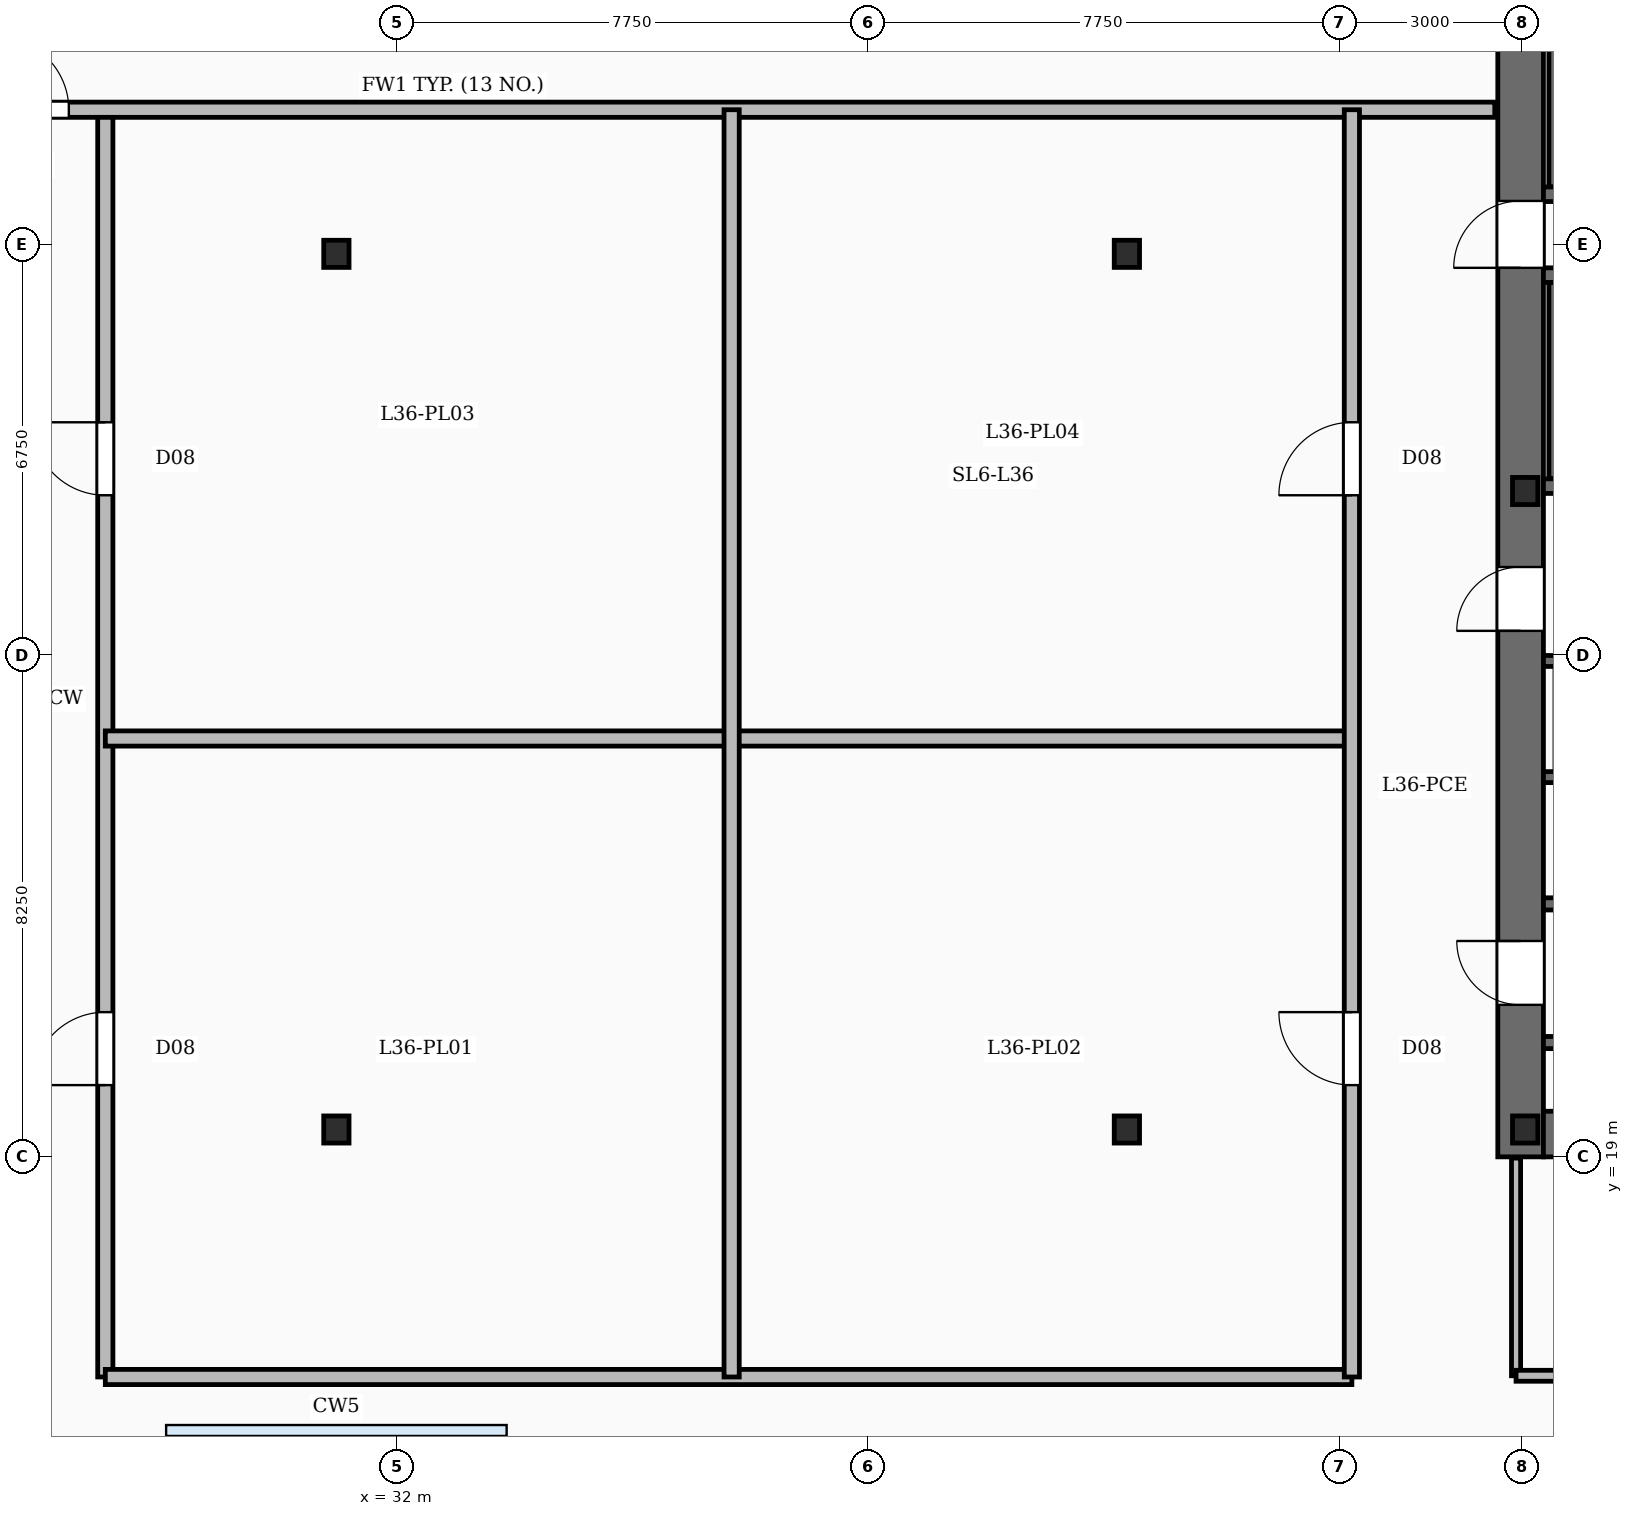
"""IFC4 building model, lengths in metres.
Left out: names, types, materials, properties, quantities, classifications, styles, units other than length and angle.
Written with IfcOpenShell. Run it as: python <this file> out.ifc"""

import sys

from ifc_helpers import new_model, si_unit, direction, frame, frame_2d, origin, origin_2d, place, context, subcontext, project, spatial, rectangle, i_section, extrude, element, fill, save


model = new_model("IFC4")
c1 = context("Model", 3, precision=1e-05, world=origin(), true_north=direction((0.0, 1.0)))
c2 = subcontext(c1, "Body", "Model", "MODEL_VIEW")
j1 = project(units=[si_unit("LENGTHUNIT", "METRE"), si_unit("PLANEANGLEUNIT", "RADIAN")], contexts=[c1])
p1 = place(None, origin())
s1 = spatial("IfcSite", under=j1, at=p1, CompositionType="ELEMENT")
p2 = place(p1, origin())
s2 = spatial("IfcBuilding", under=s1, at=p2, CompositionType="ELEMENT")
p3 = place(p2, frame((0.0, 0.0, 153.25)))
s3 = spatial("IfcBuildingStorey", under=s2, at=p3, CompositionType="ELEMENT", Elevation=153.25)
p4 = place(p3, frame((50.475, 19.0, -0.42), z_axis=(0.0, 0.0, 1.0), x_axis=(0.0, 1.0, 0.0)))
e1 = element("IfcWall", 1, at=p4, inside=s3, PredefinedType="SHEAR", context=c2, shape_type="SweptSolid", body=[
    extrude(rectangle(XDim=20.8, YDim=0.75, at=frame_2d((10.4, 0.0))), origin(), (0.0, 0.0, 1.0), 5.17),
])
p5 = place(p4, frame((2.5, 0.0, 0.42)))
e2 = element("IfcOpeningElement", 2, at=p5, cuts=e1, PredefinedType="OPENING", context=c2, shape_type="SweptSolid", body=[
    extrude(rectangle(XDim=1.05, YDim=2.15, at=frame_2d((0.525, 1.075))), frame((0.0, 0.385, 0.0), z_axis=(0.0, -1.0, 0.0), x_axis=(1.0, 0.0, 0.0)), (0.0, 0.0, 1.0), 0.77),
])
p6 = place(p4, frame((8.65, 0.0, 0.42)))
e3 = element("IfcOpeningElement", 3, at=p6, cuts=e1, PredefinedType="OPENING", context=c2, shape_type="SweptSolid", body=[
    extrude(rectangle(XDim=1.05, YDim=2.15, at=frame_2d((0.525, 1.075))), frame((0.0, 0.385, 0.0), z_axis=(0.0, -1.0, 0.0), x_axis=(1.0, 0.0, 0.0)), (0.0, 0.0, 1.0), 0.77),
])
p7 = place(p4, frame((14.62, 0.0, 0.42)))
e4 = element("IfcOpeningElement", 4, at=p7, cuts=e1, PredefinedType="OPENING", context=c2, shape_type="SweptSolid", body=[
    extrude(rectangle(XDim=1.1, YDim=2.15, at=frame_2d((0.55, 1.075))), frame((0.0, 0.385, 0.0), z_axis=(0.0, -1.0, 0.0), x_axis=(1.0, 0.0, 0.0)), (0.0, 0.0, 1.0), 0.77),
])
p8 = place(p3, frame((50.85, 19.375, -0.42), z_axis=(0.0, 0.0, 1.0), x_axis=(1.0, 0.0, 0.0)))
e5 = element("IfcWall", 5, at=p8, inside=s3, PredefinedType="SHEAR", context=c2, shape_type="SweptSolid", body=[
    extrude(rectangle(XDim=9.2, YDim=0.75, at=frame_2d((4.6, 0.0))), origin(), (0.0, 0.0, 1.0), 5.17),
])
for number, where, z_axis, x_axis in (
    (6, (50.55, 19.45, -0.42), (0.0, 0.0, 1.0), (1.0, 0.0, 0.0)),
    (7, (50.55, 29.95, -0.42), (0.0, 0.0, 1.0), (1.0, 0.0, 0.0)),
    (8, (31.0, 19.45, -0.42), (0.0, 0.0, 1.0), (1.0, 0.0, 0.0)),
    (9, (44.0, 19.45, -0.42), (0.0, 0.0, 1.0), (1.0, 0.0, 0.0)),
    (10, (31.0, 33.85, -0.42), (0.0, 0.0, 1.0), (1.0, 0.0, 0.0)),
    (11, (44.0, 33.85, -0.42), (0.0, 0.0, 1.0), (1.0, 0.0, 0.0)),
):
    element("IfcColumn", number, at=place(p3, frame(where, z_axis=z_axis, x_axis=x_axis)), inside=s3, PredefinedType="COLUMN", context=c2, shape_type="SweptSolid", body=[
        extrude(i_section(OverallWidth=0.416, OverallDepth=0.446, WebThickness=0.039, FlangeThickness=0.063, FilletRadius=0.02, at=origin_2d()), origin(), (0.0, 0.0, 1.0), 5.17),
    ])
p9 = place(p3, frame((60.05, 30.03, 0.0), z_axis=(0.0, 0.0, 1.0), x_axis=(-1.0, 0.0, 0.0)))
e12 = element("IfcWall", 12, at=p9, inside=s3, PredefinedType="SOLIDWALL", context=c2, shape_type="SweptSolid", body=[
    extrude(rectangle(XDim=9.2, YDim=0.24, at=frame_2d((4.6, 0.0))), origin(), (0.0, 0.0, 1.0), 4.75),
])
p10 = place(p9, frame((7.53, 0.0, 0.0)))
e13 = element("IfcOpeningElement", 13, at=p10, cuts=e12, PredefinedType="OPENING", context=c2, shape_type="SweptSolid", body=[
    extrude(rectangle(XDim=1.1, YDim=2.15, at=frame_2d((0.55, 1.075))), frame((0.0, 0.13, 0.0), z_axis=(0.0, -1.0, 0.0), x_axis=(1.0, 0.0, 0.0)), (0.0, 0.0, 1.0), 0.26),
])
p11 = place(p3, frame((50.85, 33.5, 0.0), z_axis=(0.0, 0.0, 1.0), x_axis=(1.0, 0.0, 0.0)))
e14 = element("IfcWall", 14, at=p11, inside=s3, PredefinedType="SOLIDWALL", context=c2, shape_type="SweptSolid", body=[
    extrude(rectangle(XDim=9.2, YDim=0.24, at=frame_2d((4.6, 0.0))), origin(), (0.0, 0.0, 1.0), 4.75),
])
p12 = place(p3, frame((51.06, 30.15, 0.0), z_axis=(0.0, 0.0, 1.0), x_axis=(0.0, 1.0, 0.0)))
e15 = element("IfcWall", 15, at=p12, inside=s3, PredefinedType="SOLIDWALL", context=c2, shape_type="SweptSolid", body=[
    extrude(rectangle(XDim=3.23, YDim=0.24, at=frame_2d((1.615, 0.0))), origin(), (0.0, 0.0, 1.0), 4.75),
])
p13 = place(p3, frame((60.05, 34.83, 0.0), z_axis=(0.0, 0.0, 1.0), x_axis=(-1.0, 0.0, 0.0)))
e16 = element("IfcWall", 16, at=p13, inside=s3, PredefinedType="SOLIDWALL", context=c2, shape_type="SweptSolid", body=[
    extrude(rectangle(XDim=9.2, YDim=0.24, at=frame_2d((4.6, 0.0))), origin(), (0.0, 0.0, 1.0), 4.75),
])
p14 = place(p13, frame((7.57, 0.0, 0.0)))
e17 = element("IfcOpeningElement", 17, at=p14, cuts=e16, PredefinedType="OPENING", context=c2, shape_type="SweptSolid", body=[
    extrude(rectangle(XDim=1.1, YDim=2.15, at=frame_2d((0.55, 1.075))), frame((0.0, 0.13, 0.0), z_axis=(0.0, -1.0, 0.0), x_axis=(1.0, 0.0, 0.0)), (0.0, 0.0, 1.0), 0.26),
])
p15 = place(p3, frame((51.06, 34.95, 0.0), z_axis=(0.0, 0.0, 1.0), x_axis=(0.0, 1.0, 0.0)))
e18 = element("IfcWall", 18, at=p15, inside=s3, PredefinedType="SOLIDWALL", context=c2, shape_type="SweptSolid", body=[
    extrude(rectangle(XDim=3.15, YDim=0.24, at=frame_2d((1.575, 0.0))), origin(), (0.0, 0.0, 1.0), 4.75),
])
p16 = place(p3, frame((50.85, 27.155, 0.0), z_axis=(0.0, 0.0, 1.0), x_axis=(1.0, 0.0, 0.0)))
e19 = element("IfcWall", 19, at=p16, inside=s3, PredefinedType="SOLIDWALL", context=c2, shape_type="SweptSolid", body=[
    extrude(rectangle(XDim=3.015, YDim=0.18, at=frame_2d((1.507, 0.0))), origin(), (0.0, 0.0, 1.0), 4.75),
])
p17 = place(p16, frame((0.935, 0.0, 0.0)))
e20 = element("IfcOpeningElement", 20, at=p17, cuts=e19, PredefinedType="OPENING", context=c2, shape_type="SweptSolid", body=[
    extrude(rectangle(XDim=1.35, YDim=2.3, at=frame_2d((0.675, 1.15))), frame((0.0, 0.1, 0.0), z_axis=(0.0, -1.0, 0.0), x_axis=(1.0, 0.0, 0.0)), (0.0, 0.0, 1.0), 0.2),
])
p18 = place(p3, frame((50.85, 25.245, 0.0), z_axis=(0.0, 0.0, 1.0), x_axis=(1.0, 0.0, 0.0)))
e21 = element("IfcWall", 21, at=p18, inside=s3, PredefinedType="SOLIDWALL", context=c2, shape_type="SweptSolid", body=[
    extrude(rectangle(XDim=3.015, YDim=0.18, at=frame_2d((1.507, 0.0))), origin(), (0.0, 0.0, 1.0), 4.75),
])
p19 = place(p3, frame((50.85, 20.88, 0.0), z_axis=(0.0, 0.0, 1.0), x_axis=(1.0, 0.0, 0.0)))
e22 = element("IfcWall", 22, at=p19, inside=s3, PredefinedType="SOLIDWALL", context=c2, shape_type="SweptSolid", body=[
    extrude(rectangle(XDim=9.2, YDim=0.2, at=frame_2d((4.6, 0.0))), origin(), (0.0, 0.0, 1.0), 3.81),
])
p20 = place(p19, frame((1.4, 0.0, 0.0)))
e23 = element("IfcOpeningElement", 23, at=p20, cuts=e22, PredefinedType="OPENING", context=c2, shape_type="SweptSolid", body=[
    extrude(rectangle(XDim=1.05, YDim=2.15, at=frame_2d((0.525, 1.075))), frame((0.0, 0.11, 0.0), z_axis=(0.0, -1.0, 0.0), x_axis=(1.0, 0.0, 0.0)), (0.0, 0.0, 1.0), 0.22),
])
p21 = place(p19, frame((5.5, 0.0, 0.0)))
e24 = element("IfcOpeningElement", 24, at=p21, cuts=e22, PredefinedType="OPENING", context=c2, shape_type="SweptSolid", body=[
    extrude(rectangle(XDim=1.05, YDim=2.15, at=frame_2d((0.525, 1.075))), frame((0.0, 0.11, 0.0), z_axis=(0.0, -1.0, 0.0), x_axis=(1.0, 0.0, 0.0)), (0.0, 0.0, 1.0), 0.22),
])
p22 = place(p3, frame((50.85, 23.16, 0.0), z_axis=(0.0, 0.0, 1.0), x_axis=(1.0, 0.0, 0.0)))
e25 = element("IfcWall", 25, at=p22, inside=s3, PredefinedType="SOLIDWALL", context=c2, shape_type="SweptSolid", body=[
    extrude(rectangle(XDim=3.03, YDim=0.2, at=frame_2d((1.515, 0.0))), origin(), (0.0, 0.0, 1.0), 3.81),
])
p23 = place(p22, frame((0.55, 0.0, 0.0)))
e26 = element("IfcOpeningElement", 26, at=p23, cuts=e25, PredefinedType="OPENING", context=c2, shape_type="SweptSolid", body=[
    extrude(rectangle(XDim=0.86, YDim=2.05, at=frame_2d((0.43, 1.025))), frame((0.0, 0.11, 0.0), z_axis=(0.0, -1.0, 0.0), x_axis=(1.0, 0.0, 0.0)), (0.0, 0.0, 1.0), 0.22),
])
p24 = place(p3, frame((50.4, 15.4, 0.0), z_axis=(0.0, 0.0, 1.0), x_axis=(1.0, 0.0, 0.0)))
e27 = element("IfcWall", 27, at=p24, inside=s3, PredefinedType="SOLIDWALL", context=c2, shape_type="SweptSolid", body=[
    extrude(rectangle(XDim=10.0, YDim=0.18, at=frame_2d((5.0, 0.0))), origin(), (0.0, 0.0, 1.0), 3.81),
])
p25 = place(p24, frame((1.19, 0.0, 0.0)))
e28 = element("IfcOpeningElement", 28, at=p25, cuts=e27, PredefinedType="OPENING", context=c2, shape_type="SweptSolid", body=[
    extrude(rectangle(XDim=0.92, YDim=2.1, at=frame_2d((0.46, 1.05))), frame((0.0, 0.1, 0.0), z_axis=(0.0, -1.0, 0.0), x_axis=(1.0, 0.0, 0.0)), (0.0, 0.0, 1.0), 0.2),
])
p26 = place(p24, frame((4.54, 0.0, 0.0)))
e29 = element("IfcOpeningElement", 29, at=p26, cuts=e27, PredefinedType="OPENING", context=c2, shape_type="SweptSolid", body=[
    extrude(rectangle(XDim=0.92, YDim=2.1, at=frame_2d((0.46, 1.05))), frame((0.0, 0.1, 0.0), z_axis=(0.0, -1.0, 0.0), x_axis=(1.0, 0.0, 0.0)), (0.0, 0.0, 1.0), 0.2),
])
p27 = place(p24, frame((7.92, 0.0, 0.0)))
e30 = element("IfcOpeningElement", 30, at=p27, cuts=e27, PredefinedType="OPENING", context=c2, shape_type="SweptSolid", body=[
    extrude(rectangle(XDim=0.86, YDim=2.05, at=frame_2d((0.43, 1.025))), frame((0.0, 0.1, 0.0), z_axis=(0.0, -1.0, 0.0), x_axis=(1.0, 0.0, 0.0)), (0.0, 0.0, 1.0), 0.2),
])
p28 = place(p3, frame((50.4, 15.4, 0.0), z_axis=(0.0, 0.0, 1.0), x_axis=(0.0, 1.0, 0.0)))
e31 = element("IfcWall", 31, at=p28, inside=s3, PredefinedType="PARTITIONING", context=c2, shape_type="SweptSolid", body=[
    extrude(rectangle(XDim=3.58, YDim=0.15, at=frame_2d((1.79, 0.0))), origin(), (0.0, 0.0, 1.0), 2.8),
])
p29 = place(p3, frame((37.5, 15.38, 0.0), z_axis=(0.0, 0.0, 1.0), x_axis=(0.0, 1.0, 0.0)))
e32 = element("IfcWall", 32, at=p29, inside=s3, PredefinedType="SOLIDWALL", context=c2, shape_type="SweptSolid", body=[
    extrude(rectangle(XDim=20.84, YDim=0.25, at=frame_2d((10.42, 0.0))), origin(), (0.0, 0.0, 1.0), 3.81),
])
for number, where, z_axis, x_axis in (
    (33, (27.2, 25.88, 0.0), (0.0, 0.0, 1.0), (1.0, 0.0, 0.0)),
    (34, (27.2, 15.38, 0.0), (0.0, 0.0, 1.0), (1.0, 0.0, 0.0)),
):
    element("IfcWall", number, at=place(p3, frame(where, z_axis=z_axis, x_axis=x_axis)), inside=s3, PredefinedType="SOLIDWALL", context=c2, shape_type="SweptSolid", body=[
        extrude(rectangle(XDim=20.5, YDim=0.25, at=frame_2d((10.25, 0.0))), origin(), (0.0, 0.0, 1.0), 3.81),
    ])
p30 = place(p3, frame((24.85, 36.22, 0.0), z_axis=(0.0, 0.0, 1.0), x_axis=(1.0, 0.0, 0.0)))
e35 = element("IfcWall", 35, at=p30, inside=s3, PredefinedType="SOLIDWALL", context=c2, shape_type="SweptSolid", body=[
    extrude(rectangle(XDim=25.2, YDim=0.25, at=frame_2d((12.6, 0.0))), origin(), (0.0, 0.0, 1.0), 3.81),
])
p31 = place(p30, frame((0.55, 0.0, 0.0)))
e36 = element("IfcOpeningElement", 36, at=p31, cuts=e35, PredefinedType="OPENING", context=c2, shape_type="SweptSolid", body=[
    extrude(rectangle(XDim=1.2, YDim=2.2, at=frame_2d((0.6, 1.1))), frame((0.0, 0.135, 0.0), z_axis=(0.0, -1.0, 0.0), x_axis=(1.0, 0.0, 0.0)), (0.0, 0.0, 1.0), 0.27),
])
p32 = place(p3, frame((27.2, 15.38, 0.0), z_axis=(0.0, 0.0, 1.0), x_axis=(0.0, 1.0, 0.0)))
e37 = element("IfcWall", 37, at=p32, inside=s3, PredefinedType="SOLIDWALL", context=c2, shape_type="SweptSolid", body=[
    extrude(rectangle(XDim=20.84, YDim=0.25, at=frame_2d((10.42, 0.0))), origin(), (0.0, 0.0, 1.0), 3.81),
])
p33 = place(p32, frame((4.8, 0.0, 0.0)))
e38 = element("IfcOpeningElement", 38, at=p33, cuts=e37, PredefinedType="OPENING", context=c2, shape_type="SweptSolid", body=[
    extrude(rectangle(XDim=1.2, YDim=2.2, at=frame_2d((0.6, 1.1))), frame((0.0, 0.135, 0.0), z_axis=(0.0, -1.0, 0.0), x_axis=(1.0, 0.0, 0.0)), (0.0, 0.0, 1.0), 0.27),
])
p34 = place(p32, frame((14.5, 0.0, 0.0)))
e39 = element("IfcOpeningElement", 39, at=p34, cuts=e37, PredefinedType="OPENING", context=c2, shape_type="SweptSolid", body=[
    extrude(rectangle(XDim=1.2, YDim=2.2, at=frame_2d((0.6, 1.1))), frame((0.0, 0.135, 0.0), z_axis=(0.0, -1.0, 0.0), x_axis=(1.0, 0.0, 0.0)), (0.0, 0.0, 1.0), 0.27),
])
p35 = place(p3, frame((47.7, 15.38, 0.0), z_axis=(0.0, 0.0, 1.0), x_axis=(0.0, 1.0, 0.0)))
e40 = element("IfcWall", 40, at=p35, inside=s3, PredefinedType="SOLIDWALL", context=c2, shape_type="SweptSolid", body=[
    extrude(rectangle(XDim=20.84, YDim=0.25, at=frame_2d((10.42, 0.0))), origin(), (0.0, 0.0, 1.0), 3.81),
])
p36 = place(p35, frame((4.8, 0.0, 0.0)))
e41 = element("IfcOpeningElement", 41, at=p36, cuts=e40, PredefinedType="OPENING", context=c2, shape_type="SweptSolid", body=[
    extrude(rectangle(XDim=1.2, YDim=2.2, at=frame_2d((0.6, 1.1))), frame((0.0, 0.135, 0.0), z_axis=(0.0, -1.0, 0.0), x_axis=(1.0, 0.0, 0.0)), (0.0, 0.0, 1.0), 0.27),
])
p37 = place(p35, frame((14.5, 0.0, 0.0)))
e42 = element("IfcOpeningElement", 42, at=p37, cuts=e40, PredefinedType="OPENING", context=c2, shape_type="SweptSolid", body=[
    extrude(rectangle(XDim=1.2, YDim=2.2, at=frame_2d((0.6, 1.1))), frame((0.0, 0.135, 0.0), z_axis=(0.0, -1.0, 0.0), x_axis=(1.0, 0.0, 0.0)), (0.0, 0.0, 1.0), 0.27),
])
p38 = place(p5, origin())
e43 = element("IfcDoor", 43, at=p38, inside=s3, OperationType="SINGLE_SWING_RIGHT", PredefinedType="DOOR", context=c2, shape_type="SweptSolid", body=[
    extrude(rectangle(XDim=1.05, YDim=2.15, at=frame_2d((0.525, 1.075))), frame((0.0, 0.025, 0.0), z_axis=(0.0, -1.0, 0.0), x_axis=(1.0, 0.0, 0.0)), (0.0, 0.0, 1.0), 0.05),
])
fill(e2, e43)
p39 = place(p6, origin())
e44 = element("IfcDoor", 44, at=p39, inside=s3, OperationType="SINGLE_SWING_LEFT", PredefinedType="DOOR", context=c2, shape_type="SweptSolid", body=[
    extrude(rectangle(XDim=1.05, YDim=2.15, at=frame_2d((0.525, 1.075))), frame((0.0, 0.025, 0.0), z_axis=(0.0, -1.0, 0.0), x_axis=(1.0, 0.0, 0.0)), (0.0, 0.0, 1.0), 0.05),
])
fill(e3, e44)
p40 = place(p7, origin())
e45 = element("IfcDoor", 45, at=p40, inside=s3, OperationType="SINGLE_SWING_LEFT", PredefinedType="DOOR", context=c2, shape_type="SweptSolid", body=[
    extrude(rectangle(XDim=1.1, YDim=2.15, at=frame_2d((0.55, 1.075))), frame((0.0, 0.025, 0.0), z_axis=(0.0, -1.0, 0.0), x_axis=(1.0, 0.0, 0.0)), (0.0, 0.0, 1.0), 0.05),
])
fill(e4, e45)
p41 = place(p31, origin())
e46 = element("IfcDoor", 46, at=p41, inside=s3, OperationType="SINGLE_SWING_LEFT", PredefinedType="DOOR", context=c2, shape_type="SweptSolid", body=[
    extrude(rectangle(XDim=1.2, YDim=2.2, at=frame_2d((0.6, 1.1))), frame((0.0, 0.025, 0.0), z_axis=(0.0, -1.0, 0.0), x_axis=(1.0, 0.0, 0.0)), (0.0, 0.0, 1.0), 0.05),
])
fill(e36, e46)
p42 = place(p33, origin())
e47 = element("IfcDoor", 47, at=p42, inside=s3, OperationType="SINGLE_SWING_LEFT", PredefinedType="DOOR", context=c2, shape_type="SweptSolid", body=[
    extrude(rectangle(XDim=1.2, YDim=2.2, at=frame_2d((0.6, 1.1))), frame((0.0, 0.025, 0.0), z_axis=(0.0, -1.0, 0.0), x_axis=(1.0, 0.0, 0.0)), (0.0, 0.0, 1.0), 0.05),
])
fill(e38, e47)
p43 = place(p34, origin())
e48 = element("IfcDoor", 48, at=p43, inside=s3, OperationType="SINGLE_SWING_RIGHT", PredefinedType="DOOR", context=c2, shape_type="SweptSolid", body=[
    extrude(rectangle(XDim=1.2, YDim=2.2, at=frame_2d((0.6, 1.1))), frame((0.0, 0.025, 0.0), z_axis=(0.0, -1.0, 0.0), x_axis=(1.0, 0.0, 0.0)), (0.0, 0.0, 1.0), 0.05),
])
fill(e39, e48)
p44 = place(p36, origin())
e49 = element("IfcDoor", 49, at=p44, inside=s3, OperationType="SINGLE_SWING_RIGHT", PredefinedType="DOOR", context=c2, shape_type="SweptSolid", body=[
    extrude(rectangle(XDim=1.2, YDim=2.2, at=frame_2d((0.6, 1.1))), frame((0.0, 0.025, 0.0), z_axis=(0.0, -1.0, 0.0), x_axis=(1.0, 0.0, 0.0)), (0.0, 0.0, 1.0), 0.05),
])
fill(e41, e49)
p45 = place(p37, origin())
e50 = element("IfcDoor", 50, at=p45, inside=s3, OperationType="SINGLE_SWING_LEFT", PredefinedType="DOOR", context=c2, shape_type="SweptSolid", body=[
    extrude(rectangle(XDim=1.2, YDim=2.2, at=frame_2d((0.6, 1.1))), frame((0.0, 0.025, 0.0), z_axis=(0.0, -1.0, 0.0), x_axis=(1.0, 0.0, 0.0)), (0.0, 0.0, 1.0), 0.05),
])
fill(e42, e50)
save(model, sys.argv[1])
